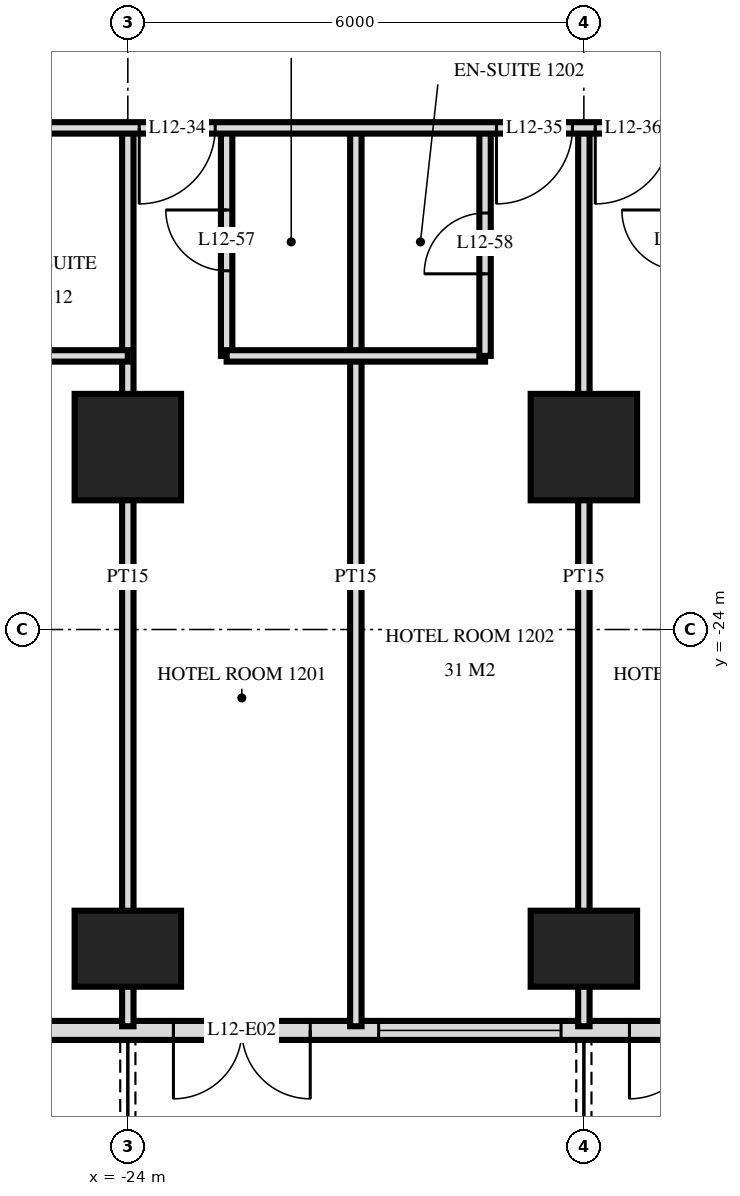
"""IFC4 building model, lengths in metres.
Left out: names, types, materials, properties, quantities, classifications, styles, units other than length and angle.
Written with IfcOpenShell. Run it as: python <this file> out.ifc"""

import sys

from ifc_helpers import new_model, si_unit, direction, frame, frame_2d, origin, origin_2d, place, context, subcontext, project, spatial, rectangle, extrude, element, fill, save


model = new_model("IFC4")
c1 = context("Model", 3, precision=1e-05, world=origin(), true_north=direction((0.0, 1.0)))
c2 = subcontext(c1, "Body", "Model", "MODEL_VIEW")
j1 = project(units=[si_unit("LENGTHUNIT", "METRE"), si_unit("PLANEANGLEUNIT", "RADIAN")], contexts=[c1])
p1 = place(None, origin())
s1 = spatial("IfcSite", under=j1, at=p1, CompositionType="ELEMENT")
p2 = place(p1, origin())
s2 = spatial("IfcBuilding", under=s1, at=p2, CompositionType="ELEMENT")
p3 = place(p2, frame((0.0, 0.0, 52.8)))
s3 = spatial("IfcBuildingStorey", under=s2, at=p3, CompositionType="ELEMENT", Elevation=52.8)
p4 = place(p3, frame((-24.0, -28.2, 0.0), z_axis=(0.0, 0.0, 1.0), x_axis=(1.0, 0.0, 0.0)))
e1 = element("IfcColumn", 1, at=p4, inside=s3, PredefinedType="COLUMN", context=c2, shape_type="SweptSolid", body=[
    extrude(rectangle(XDim=1.4, YDim=1.0, at=origin_2d()), origin(), (0.0, 0.0, 1.0), 3.6),
])
p5 = place(p3, frame((-24.0, -21.6, 0.0), z_axis=(0.0, 0.0, 1.0), x_axis=(1.0, 0.0, 0.0)))
e2 = element("IfcColumn", 2, at=p5, inside=s3, PredefinedType="COLUMN", context=c2, shape_type="SweptSolid", body=[
    extrude(rectangle(XDim=1.4, YDim=1.4, at=origin_2d()), origin(), (0.0, 0.0, 1.0), 3.6),
])
p6 = place(p3, frame((-18.0, -28.2, 0.0), z_axis=(0.0, 0.0, 1.0), x_axis=(1.0, 0.0, 0.0)))
e3 = element("IfcColumn", 3, at=p6, inside=s3, PredefinedType="COLUMN", context=c2, shape_type="SweptSolid", body=[
    extrude(rectangle(XDim=1.4, YDim=1.0, at=origin_2d()), origin(), (0.0, 0.0, 1.0), 3.6),
])
p7 = place(p3, frame((-18.0, -21.6, 0.0), z_axis=(0.0, 0.0, 1.0), x_axis=(1.0, 0.0, 0.0)))
e4 = element("IfcColumn", 4, at=p7, inside=s3, PredefinedType="COLUMN", context=c2, shape_type="SweptSolid", body=[
    extrude(rectangle(XDim=1.4, YDim=1.4, at=origin_2d()), origin(), (0.0, 0.0, 1.0), 3.6),
])
p8 = place(p3, frame((-28.775, -29.275, 0.0), z_axis=(0.0, 0.0, 1.0), x_axis=(1.0, 0.0, 0.0)))
e5 = element("IfcWall", 5, at=p8, inside=s3, PredefinedType="SOLIDWALL", context=c2, shape_type="SweptSolid", body=[
    extrude(rectangle(XDim=57.551, YDim=0.25, at=frame_2d((28.775, 0.0))), origin(), (0.0, 0.0, 1.0), 3.32),
])
p9 = place(p8, frame((0.575, 0.0, 0.0)))
e6 = element("IfcOpeningElement", 6, at=p9, cuts=e5, PredefinedType="OPENING", context=c2, shape_type="SweptSolid", body=[
    extrude(rectangle(XDim=1.8, YDim=2.4, at=frame_2d((0.9, 1.2))), frame((0.0, 0.135, 0.0), z_axis=(0.0, -1.0, 0.0), x_axis=(1.0, 0.0, 0.0)), (0.0, 0.0, 1.0), 0.27),
])
p10 = place(p8, frame((5.375, 0.0, 0.0)))
e7 = element("IfcOpeningElement", 7, at=p10, cuts=e5, PredefinedType="OPENING", context=c2, shape_type="SweptSolid", body=[
    extrude(rectangle(XDim=1.8, YDim=2.4, at=frame_2d((0.9, 1.2))), frame((0.0, 0.135, 0.0), z_axis=(0.0, -1.0, 0.0), x_axis=(1.0, 0.0, 0.0)), (0.0, 0.0, 1.0), 0.27),
])
p11 = place(p8, frame((8.075, 0.0, 0.3)))
e8 = element("IfcOpeningElement", 8, at=p11, cuts=e5, PredefinedType="OPENING", context=c2, shape_type="SweptSolid", body=[
    extrude(rectangle(XDim=2.4, YDim=2.1, at=frame_2d((1.2, 1.05))), frame((0.0, 0.135, 0.0), z_axis=(0.0, -1.0, 0.0), x_axis=(1.0, 0.0, 0.0)), (0.0, 0.0, 1.0), 0.27),
])
p12 = place(p8, frame((11.375, 0.0, 0.0)))
e9 = element("IfcOpeningElement", 9, at=p12, cuts=e5, PredefinedType="OPENING", context=c2, shape_type="SweptSolid", body=[
    extrude(rectangle(XDim=1.8, YDim=2.4, at=frame_2d((0.9, 1.2))), frame((0.0, 0.135, 0.0), z_axis=(0.0, -1.0, 0.0), x_axis=(1.0, 0.0, 0.0)), (0.0, 0.0, 1.0), 0.27),
])
p13 = place(p8, frame((14.075, 0.0, 0.3)))
e10 = element("IfcOpeningElement", 10, at=p13, cuts=e5, PredefinedType="OPENING", context=c2, shape_type="SweptSolid", body=[
    extrude(rectangle(XDim=2.4, YDim=2.1, at=frame_2d((1.2, 1.05))), frame((0.0, 0.135, 0.0), z_axis=(0.0, -1.0, 0.0), x_axis=(1.0, 0.0, 0.0)), (0.0, 0.0, 1.0), 0.27),
])
p14 = place(p8, frame((17.375, 0.0, 0.0)))
e11 = element("IfcOpeningElement", 11, at=p14, cuts=e5, PredefinedType="OPENING", context=c2, shape_type="SweptSolid", body=[
    extrude(rectangle(XDim=1.8, YDim=2.4, at=frame_2d((0.9, 1.2))), frame((0.0, 0.135, 0.0), z_axis=(0.0, -1.0, 0.0), x_axis=(1.0, 0.0, 0.0)), (0.0, 0.0, 1.0), 0.27),
])
p15 = place(p8, frame((20.075, 0.0, 0.3)))
e12 = element("IfcOpeningElement", 12, at=p15, cuts=e5, PredefinedType="OPENING", context=c2, shape_type="SweptSolid", body=[
    extrude(rectangle(XDim=2.4, YDim=2.1, at=frame_2d((1.2, 1.05))), frame((0.0, 0.135, 0.0), z_axis=(0.0, -1.0, 0.0), x_axis=(1.0, 0.0, 0.0)), (0.0, 0.0, 1.0), 0.27),
])
p16 = place(p8, frame((23.075, 0.0, 0.3)))
e13 = element("IfcOpeningElement", 13, at=p16, cuts=e5, PredefinedType="OPENING", context=c2, shape_type="SweptSolid", body=[
    extrude(rectangle(XDim=2.4, YDim=2.1, at=frame_2d((1.2, 1.05))), frame((0.0, 0.135, 0.0), z_axis=(0.0, -1.0, 0.0), x_axis=(1.0, 0.0, 0.0)), (0.0, 0.0, 1.0), 0.27),
])
p17 = place(p8, frame((26.375, 0.0, 0.0)))
e14 = element("IfcOpeningElement", 14, at=p17, cuts=e5, PredefinedType="OPENING", context=c2, shape_type="SweptSolid", body=[
    extrude(rectangle(XDim=1.8, YDim=2.4, at=frame_2d((0.9, 1.2))), frame((0.0, 0.135, 0.0), z_axis=(0.0, -1.0, 0.0), x_axis=(1.0, 0.0, 0.0)), (0.0, 0.0, 1.0), 0.27),
])
p18 = place(p8, frame((29.375, 0.0, 0.0)))
e15 = element("IfcOpeningElement", 15, at=p18, cuts=e5, PredefinedType="OPENING", context=c2, shape_type="SweptSolid", body=[
    extrude(rectangle(XDim=1.8, YDim=2.4, at=frame_2d((0.9, 1.2))), frame((0.0, 0.135, 0.0), z_axis=(0.0, -1.0, 0.0), x_axis=(1.0, 0.0, 0.0)), (0.0, 0.0, 1.0), 0.27),
])
p19 = place(p8, frame((32.075, 0.0, 0.3)))
e16 = element("IfcOpeningElement", 16, at=p19, cuts=e5, PredefinedType="OPENING", context=c2, shape_type="SweptSolid", body=[
    extrude(rectangle(XDim=2.4, YDim=2.1, at=frame_2d((1.2, 1.05))), frame((0.0, 0.135, 0.0), z_axis=(0.0, -1.0, 0.0), x_axis=(1.0, 0.0, 0.0)), (0.0, 0.0, 1.0), 0.27),
])
p20 = place(p8, frame((35.075, 0.0, 0.3)))
e17 = element("IfcOpeningElement", 17, at=p20, cuts=e5, PredefinedType="OPENING", context=c2, shape_type="SweptSolid", body=[
    extrude(rectangle(XDim=2.4, YDim=2.1, at=frame_2d((1.2, 1.05))), frame((0.0, 0.135, 0.0), z_axis=(0.0, -1.0, 0.0), x_axis=(1.0, 0.0, 0.0)), (0.0, 0.0, 1.0), 0.27),
])
p21 = place(p8, frame((38.375, 0.0, 0.0)))
e18 = element("IfcOpeningElement", 18, at=p21, cuts=e5, PredefinedType="OPENING", context=c2, shape_type="SweptSolid", body=[
    extrude(rectangle(XDim=1.8, YDim=2.4, at=frame_2d((0.9, 1.2))), frame((0.0, 0.135, 0.0), z_axis=(0.0, -1.0, 0.0), x_axis=(1.0, 0.0, 0.0)), (0.0, 0.0, 1.0), 0.27),
])
p22 = place(p8, frame((41.375, 0.0, 0.0)))
e19 = element("IfcOpeningElement", 19, at=p22, cuts=e5, PredefinedType="OPENING", context=c2, shape_type="SweptSolid", body=[
    extrude(rectangle(XDim=1.8, YDim=2.4, at=frame_2d((0.9, 1.2))), frame((0.0, 0.135, 0.0), z_axis=(0.0, -1.0, 0.0), x_axis=(1.0, 0.0, 0.0)), (0.0, 0.0, 1.0), 0.27),
])
p23 = place(p8, frame((44.075, 0.0, 0.3)))
e20 = element("IfcOpeningElement", 20, at=p23, cuts=e5, PredefinedType="OPENING", context=c2, shape_type="SweptSolid", body=[
    extrude(rectangle(XDim=2.4, YDim=2.1, at=frame_2d((1.2, 1.05))), frame((0.0, 0.135, 0.0), z_axis=(0.0, -1.0, 0.0), x_axis=(1.0, 0.0, 0.0)), (0.0, 0.0, 1.0), 0.27),
])
p24 = place(p8, frame((47.075, 0.0, 0.3)))
e21 = element("IfcOpeningElement", 21, at=p24, cuts=e5, PredefinedType="OPENING", context=c2, shape_type="SweptSolid", body=[
    extrude(rectangle(XDim=2.4, YDim=2.1, at=frame_2d((1.2, 1.05))), frame((0.0, 0.135, 0.0), z_axis=(0.0, -1.0, 0.0), x_axis=(1.0, 0.0, 0.0)), (0.0, 0.0, 1.0), 0.27),
])
p25 = place(p8, frame((50.375, 0.0, 0.0)))
e22 = element("IfcOpeningElement", 22, at=p25, cuts=e5, PredefinedType="OPENING", context=c2, shape_type="SweptSolid", body=[
    extrude(rectangle(XDim=1.8, YDim=2.4, at=frame_2d((0.9, 1.2))), frame((0.0, 0.135, 0.0), z_axis=(0.0, -1.0, 0.0), x_axis=(1.0, 0.0, 0.0)), (0.0, 0.0, 1.0), 0.27),
])
p26 = place(p8, frame((53.375, 0.0, 0.0)))
e23 = element("IfcOpeningElement", 23, at=p26, cuts=e5, PredefinedType="OPENING", context=c2, shape_type="SweptSolid", body=[
    extrude(rectangle(XDim=1.8, YDim=2.4, at=frame_2d((0.9, 1.2))), frame((0.0, 0.135, 0.0), z_axis=(0.0, -1.0, 0.0), x_axis=(1.0, 0.0, 0.0)), (0.0, 0.0, 1.0), 0.27),
])
p27 = place(p3, frame((-18.0, -29.22, 0.0), z_axis=(0.0, 0.0, 1.0), x_axis=(0.0, 1.0, 0.0)))
e24 = element("IfcWall", 24, at=p27, inside=s3, PredefinedType="PARTITIONING", context=c2, shape_type="SweptSolid", body=[
    extrude(rectangle(XDim=11.82, YDim=0.15, at=frame_2d((5.91, 0.0))), origin(), (0.0, 0.0, 1.0), 3.32),
])
p28 = place(p3, frame((-19.3, -20.4, 0.0), z_axis=(0.0, 0.0, 1.0), x_axis=(0.0, 1.0, 0.0)))
e25 = element("IfcWall", 25, at=p28, inside=s3, PredefinedType="PARTITIONING", context=c2, shape_type="SweptSolid", body=[
    extrude(rectangle(XDim=3.0, YDim=0.15, at=frame_2d((1.5, 0.0))), origin(), (0.0, 0.0, 1.0), 3.32),
])
p29 = place(p28, frame((1.08, 0.0, 0.0)))
e26 = element("IfcOpeningElement", 26, at=p29, cuts=e25, PredefinedType="OPENING", context=c2, shape_type="SweptSolid", body=[
    extrude(rectangle(XDim=0.8, YDim=2.1, at=frame_2d((0.4, 1.05))), frame((0.0, 0.085, 0.0), z_axis=(0.0, -1.0, 0.0), x_axis=(1.0, 0.0, 0.0)), (0.0, 0.0, 1.0), 0.17),
])
p30 = place(p3, frame((-21.0, -29.22, 0.0), z_axis=(0.0, 0.0, 1.0), x_axis=(0.0, 1.0, 0.0)))
e27 = element("IfcWall", 27, at=p30, inside=s3, PredefinedType="PARTITIONING", context=c2, shape_type="SweptSolid", body=[
    extrude(rectangle(XDim=11.82, YDim=0.15, at=frame_2d((5.91, 0.0))), origin(), (0.0, 0.0, 1.0), 3.32),
])
p31 = place(p3, frame((-22.7, -20.4, 0.0), z_axis=(0.0, 0.0, 1.0), x_axis=(0.0, 1.0, 0.0)))
e28 = element("IfcWall", 28, at=p31, inside=s3, PredefinedType="PARTITIONING", context=c2, shape_type="SweptSolid", body=[
    extrude(rectangle(XDim=3.0, YDim=0.15, at=frame_2d((1.5, 0.0))), origin(), (0.0, 0.0, 1.0), 3.32),
])
p32 = place(p31, frame((1.12, 0.0, 0.0)))
e29 = element("IfcOpeningElement", 29, at=p32, cuts=e28, PredefinedType="OPENING", context=c2, shape_type="SweptSolid", body=[
    extrude(rectangle(XDim=0.8, YDim=2.1, at=frame_2d((0.4, 1.05))), frame((0.0, 0.085, 0.0), z_axis=(0.0, -1.0, 0.0), x_axis=(1.0, 0.0, 0.0)), (0.0, 0.0, 1.0), 0.17),
])
p33 = place(p3, frame((-24.0, -29.22, 0.0), z_axis=(0.0, 0.0, 1.0), x_axis=(0.0, 1.0, 0.0)))
e30 = element("IfcWall", 30, at=p33, inside=s3, PredefinedType="PARTITIONING", context=c2, shape_type="SweptSolid", body=[
    extrude(rectangle(XDim=11.82, YDim=0.15, at=frame_2d((5.91, 0.0))), origin(), (0.0, 0.0, 1.0), 3.32),
])
p34 = place(p3, frame((-27.0, -20.4, 0.0), z_axis=(0.0, 0.0, 1.0), x_axis=(1.0, 0.0, 0.0)))
e31 = element("IfcWall", 31, at=p34, inside=s3, PredefinedType="PARTITIONING", context=c2, shape_type="SweptSolid", body=[
    extrude(rectangle(XDim=3.0, YDim=0.15, at=frame_2d((1.5, 0.0))), origin(), (0.0, 0.0, 1.0), 3.32),
])
p35 = place(p3, frame((-22.7, -20.4, 0.0), z_axis=(0.0, 0.0, 1.0), x_axis=(1.0, 0.0, 0.0)))
e32 = element("IfcWall", 32, at=p35, inside=s3, PredefinedType="PARTITIONING", context=c2, shape_type="SweptSolid", body=[
    extrude(rectangle(XDim=3.4, YDim=0.15, at=frame_2d((1.7, 0.0))), origin(), (0.0, 0.0, 1.0), 3.32),
])
p36 = place(p3, frame((-33.12, -17.4, 0.0), z_axis=(0.0, 0.0, 1.0), x_axis=(1.0, 0.0, 0.0)))
e33 = element("IfcWall", 33, at=p36, inside=s3, PredefinedType="PARTITIONING", context=c2, shape_type="SweptSolid", body=[
    extrude(rectangle(XDim=66.24, YDim=0.15, at=frame_2d((33.12, 0.0))), origin(), (0.0, 0.0, 1.0), 3.32),
])
p37 = place(p36, frame((9.27, 0.0, 0.0)))
e34 = element("IfcOpeningElement", 34, at=p37, cuts=e33, PredefinedType="OPENING", context=c2, shape_type="SweptSolid", body=[
    extrude(rectangle(XDim=1.0, YDim=2.1, at=frame_2d((0.5, 1.05))), frame((0.0, 0.085, 0.0), z_axis=(0.0, -1.0, 0.0), x_axis=(1.0, 0.0, 0.0)), (0.0, 0.0, 1.0), 0.17),
])
p38 = place(p36, frame((13.97, 0.0, 0.0)))
e35 = element("IfcOpeningElement", 35, at=p38, cuts=e33, PredefinedType="OPENING", context=c2, shape_type="SweptSolid", body=[
    extrude(rectangle(XDim=1.0, YDim=2.1, at=frame_2d((0.5, 1.05))), frame((0.0, 0.085, 0.0), z_axis=(0.0, -1.0, 0.0), x_axis=(1.0, 0.0, 0.0)), (0.0, 0.0, 1.0), 0.17),
])
p39 = place(p36, frame((15.27, 0.0, 0.0)))
e36 = element("IfcOpeningElement", 36, at=p39, cuts=e33, PredefinedType="OPENING", context=c2, shape_type="SweptSolid", body=[
    extrude(rectangle(XDim=1.0, YDim=2.1, at=frame_2d((0.5, 1.05))), frame((0.0, 0.085, 0.0), z_axis=(0.0, -1.0, 0.0), x_axis=(1.0, 0.0, 0.0)), (0.0, 0.0, 1.0), 0.17),
])
p40 = place(p36, frame((19.97, 0.0, 0.0)))
e37 = element("IfcOpeningElement", 37, at=p40, cuts=e33, PredefinedType="OPENING", context=c2, shape_type="SweptSolid", body=[
    extrude(rectangle(XDim=1.0, YDim=2.1, at=frame_2d((0.5, 1.05))), frame((0.0, 0.085, 0.0), z_axis=(0.0, -1.0, 0.0), x_axis=(1.0, 0.0, 0.0)), (0.0, 0.0, 1.0), 0.17),
])
p41 = place(p36, frame((22.27, 0.0, 0.0)))
e38 = element("IfcOpeningElement", 38, at=p41, cuts=e33, PredefinedType="OPENING", context=c2, shape_type="SweptSolid", body=[
    extrude(rectangle(XDim=1.0, YDim=2.1, at=frame_2d((0.5, 1.05))), frame((0.0, 0.085, 0.0), z_axis=(0.0, -1.0, 0.0), x_axis=(1.0, 0.0, 0.0)), (0.0, 0.0, 1.0), 0.17),
])
p42 = place(p36, frame((28.97, 0.0, 0.0)))
e39 = element("IfcOpeningElement", 39, at=p42, cuts=e33, PredefinedType="OPENING", context=c2, shape_type="SweptSolid", body=[
    extrude(rectangle(XDim=1.0, YDim=2.1, at=frame_2d((0.5, 1.05))), frame((0.0, 0.085, 0.0), z_axis=(0.0, -1.0, 0.0), x_axis=(1.0, 0.0, 0.0)), (0.0, 0.0, 1.0), 0.17),
])
p43 = place(p36, frame((30.27, 0.0, 0.0)))
e40 = element("IfcOpeningElement", 40, at=p43, cuts=e33, PredefinedType="OPENING", context=c2, shape_type="SweptSolid", body=[
    extrude(rectangle(XDim=1.0, YDim=2.1, at=frame_2d((0.5, 1.05))), frame((0.0, 0.085, 0.0), z_axis=(0.0, -1.0, 0.0), x_axis=(1.0, 0.0, 0.0)), (0.0, 0.0, 1.0), 0.17),
])
p44 = place(p36, frame((34.97, 0.0, 0.0)))
e41 = element("IfcOpeningElement", 41, at=p44, cuts=e33, PredefinedType="OPENING", context=c2, shape_type="SweptSolid", body=[
    extrude(rectangle(XDim=1.0, YDim=2.1, at=frame_2d((0.5, 1.05))), frame((0.0, 0.085, 0.0), z_axis=(0.0, -1.0, 0.0), x_axis=(1.0, 0.0, 0.0)), (0.0, 0.0, 1.0), 0.17),
])
p45 = place(p36, frame((36.27, 0.0, 0.0)))
e42 = element("IfcOpeningElement", 42, at=p45, cuts=e33, PredefinedType="OPENING", context=c2, shape_type="SweptSolid", body=[
    extrude(rectangle(XDim=1.0, YDim=2.1, at=frame_2d((0.5, 1.05))), frame((0.0, 0.085, 0.0), z_axis=(0.0, -1.0, 0.0), x_axis=(1.0, 0.0, 0.0)), (0.0, 0.0, 1.0), 0.17),
])
p46 = place(p36, frame((39.82, 0.0, 0.0)))
e43 = element("IfcOpeningElement", 43, at=p46, cuts=e33, PredefinedType="OPENING", context=c2, shape_type="SweptSolid", body=[
    extrude(rectangle(XDim=1.0, YDim=2.1, at=frame_2d((0.5, 1.05))), frame((0.0, 0.085, 0.0), z_axis=(0.0, -1.0, 0.0), x_axis=(1.0, 0.0, 0.0)), (0.0, 0.0, 1.0), 0.17),
])
p47 = place(p36, frame((51.27, 0.0, 0.0)))
e44 = element("IfcOpeningElement", 44, at=p47, cuts=e33, PredefinedType="OPENING", context=c2, shape_type="SweptSolid", body=[
    extrude(rectangle(XDim=1.0, YDim=2.1, at=frame_2d((0.5, 1.05))), frame((0.0, 0.085, 0.0), z_axis=(0.0, -1.0, 0.0), x_axis=(1.0, 0.0, 0.0)), (0.0, 0.0, 1.0), 0.17),
])
p48 = place(p36, frame((4.42, 0.0, 0.0)))
e45 = element("IfcOpeningElement", 45, at=p48, cuts=e33, PredefinedType="OPENING", context=c2, shape_type="SweptSolid", body=[
    extrude(rectangle(XDim=1.0, YDim=2.1, at=frame_2d((0.5, 1.05))), frame((0.0, 0.085, 0.0), z_axis=(0.0, -1.0, 0.0), x_axis=(1.0, 0.0, 0.0)), (0.0, 0.0, 1.0), 0.17),
])
p49 = place(p36, frame((54.82, 0.0, 0.0)))
e46 = element("IfcOpeningElement", 46, at=p49, cuts=e33, PredefinedType="OPENING", context=c2, shape_type="SweptSolid", body=[
    extrude(rectangle(XDim=1.0, YDim=2.1, at=frame_2d((0.5, 1.05))), frame((0.0, 0.085, 0.0), z_axis=(0.0, -1.0, 0.0), x_axis=(1.0, 0.0, 0.0)), (0.0, 0.0, 1.0), 0.17),
])
p50 = place(p10, frame((0.9, 0.0, 0.0), z_axis=(0.0, 0.0, 1.0), x_axis=(-1.0, 0.0, 0.0)))
e47 = element("IfcDoor", 47, at=p50, inside=s3, OperationType="DOUBLE_DOOR_SINGLE_SWING", PredefinedType="DOOR", context=c2, shape_type="SweptSolid", body=[
    extrude(rectangle(XDim=1.8, YDim=2.4, at=frame_2d((0.0, 1.2))), frame((0.0, -0.025, 0.0), z_axis=(0.0, 1.0, 0.0), x_axis=(-1.0, 0.0, 0.0)), (0.0, 0.0, 1.0), 0.05),
])
fill(e7, e47)
p51 = place(p11, origin())
e48 = element("IfcWindow", 48, at=p51, inside=s3, PartitioningType="SINGLE_PANEL", PredefinedType="WINDOW", context=c2, shape_type="SweptSolid", body=[
    extrude(rectangle(XDim=2.4, YDim=2.1, at=frame_2d((1.2, 1.05))), frame((0.0, 0.03, 0.0), z_axis=(0.0, -1.0, 0.0), x_axis=(1.0, 0.0, 0.0)), (0.0, 0.0, 1.0), 0.06),
])
fill(e8, e48)
p52 = place(p12, frame((0.9, 0.0, 0.0), z_axis=(0.0, 0.0, 1.0), x_axis=(-1.0, 0.0, 0.0)))
e49 = element("IfcDoor", 49, at=p52, inside=s3, OperationType="DOUBLE_DOOR_SINGLE_SWING", PredefinedType="DOOR", context=c2, shape_type="SweptSolid", body=[
    extrude(rectangle(XDim=1.8, YDim=2.4, at=frame_2d((0.0, 1.2))), frame((0.0, -0.025, 0.0), z_axis=(0.0, 1.0, 0.0), x_axis=(-1.0, 0.0, 0.0)), (0.0, 0.0, 1.0), 0.05),
])
fill(e9, e49)
p53 = place(p37, frame((0.5, 0.0, 0.0), z_axis=(0.0, 0.0, 1.0), x_axis=(-1.0, 0.0, 0.0)))
e50 = element("IfcDoor", 50, at=p53, inside=s3, OperationType="SINGLE_SWING_LEFT", PredefinedType="DOOR", context=c2, shape_type="SweptSolid", body=[
    extrude(rectangle(XDim=1.0, YDim=2.1, at=frame_2d((0.0, 1.05))), frame((0.0, -0.025, 0.0), z_axis=(0.0, 1.0, 0.0), x_axis=(-1.0, 0.0, 0.0)), (0.0, 0.0, 1.0), 0.05),
])
fill(e34, e50)
p54 = place(p38, frame((0.5, 0.0, 0.0), z_axis=(0.0, 0.0, 1.0), x_axis=(-1.0, 0.0, 0.0)))
e51 = element("IfcDoor", 51, at=p54, inside=s3, OperationType="SINGLE_SWING_LEFT", PredefinedType="DOOR", context=c2, shape_type="SweptSolid", body=[
    extrude(rectangle(XDim=1.0, YDim=2.1, at=frame_2d((0.0, 1.05))), frame((0.0, -0.025, 0.0), z_axis=(0.0, 1.0, 0.0), x_axis=(-1.0, 0.0, 0.0)), (0.0, 0.0, 1.0), 0.05),
])
fill(e35, e51)
p55 = place(p39, frame((0.5, 0.0, 0.0), z_axis=(0.0, 0.0, 1.0), x_axis=(-1.0, 0.0, 0.0)))
e52 = element("IfcDoor", 52, at=p55, inside=s3, OperationType="SINGLE_SWING_LEFT", PredefinedType="DOOR", context=c2, shape_type="SweptSolid", body=[
    extrude(rectangle(XDim=1.0, YDim=2.1, at=frame_2d((0.0, 1.05))), frame((0.0, -0.025, 0.0), z_axis=(0.0, 1.0, 0.0), x_axis=(-1.0, 0.0, 0.0)), (0.0, 0.0, 1.0), 0.05),
])
fill(e36, e52)
p56 = place(p32, origin())
e53 = element("IfcDoor", 53, at=p56, inside=s3, OperationType="SINGLE_SWING_LEFT", PredefinedType="DOOR", context=c2, shape_type="SweptSolid", body=[
    extrude(rectangle(XDim=0.8, YDim=2.1, at=frame_2d((0.4, 1.05))), frame((0.0, 0.025, 0.0), z_axis=(0.0, -1.0, 0.0), x_axis=(1.0, 0.0, 0.0)), (0.0, 0.0, 1.0), 0.05),
])
fill(e29, e53)
p57 = place(p29, origin())
e54 = element("IfcDoor", 54, at=p57, inside=s3, OperationType="SINGLE_SWING_RIGHT", PredefinedType="DOOR", context=c2, shape_type="SweptSolid", body=[
    extrude(rectangle(XDim=0.8, YDim=2.1, at=frame_2d((0.4, 1.05))), frame((0.0, 0.025, 0.0), z_axis=(0.0, -1.0, 0.0), x_axis=(1.0, 0.0, 0.0)), (0.0, 0.0, 1.0), 0.05),
])
fill(e26, e54)
save(model, sys.argv[1])
